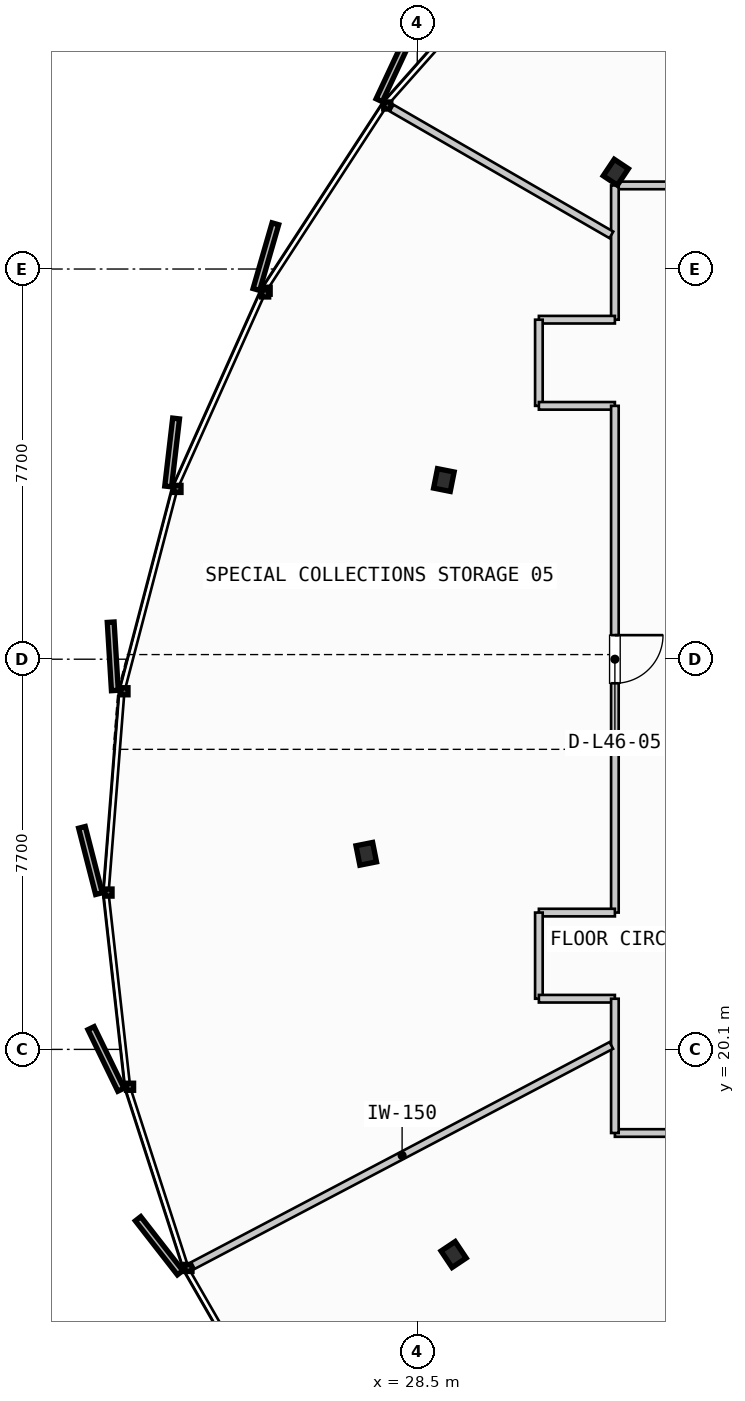
"""IFC4 building model, lengths in metres.
Left out: names, types, materials, properties, quantities, classifications, styles, units other than length and angle.
Written with IfcOpenShell. Run it as: python <this file> out.ifc"""

import sys

from ifc_helpers import new_model, si_unit, direction, frame, frame_2d, origin, origin_2d, place, context, subcontext, project, spatial, rectangle, i_section, extrude, source, transform, mapped, element, fill, save


model = new_model("IFC4")
c1 = context("Model", 3, precision=1e-05, world=origin(), true_north=direction((0.0, 1.0)))
c2 = subcontext(c1, "Body", "Model", "MODEL_VIEW")
j1 = project(units=[si_unit("LENGTHUNIT", "METRE"), si_unit("PLANEANGLEUNIT", "RADIAN")], contexts=[c1])
p1 = place(None, origin())
s1 = spatial("IfcSite", under=j1, at=p1, CompositionType="ELEMENT")
p2 = place(p1, origin())
s2 = spatial("IfcBuilding", under=s1, at=p2, CompositionType="ELEMENT")
p3 = place(p2, frame((0.0, 0.0, 179.9)))
s3 = spatial("IfcBuildingStorey", under=s2, at=p3, CompositionType="ELEMENT", Elevation=179.9)
m1 = source(origin(), c2, "Body", "SweptSolid", [
    extrude(i_section(OverallWidth=0.391, OverallDepth=0.335, WebThickness=0.023, FlangeThickness=0.034, FilletRadius=0.015, at=origin_2d()), origin(), (0.0, 0.0, 1.0), 3.26),
])
for number, where, z_axis, x_axis in (
    (1, (32.418, 37.409, 0.0), (0.0, 0.0, 1.0), (-0.831, 0.556, 0.0)),
    (2, (29.025, 31.336, 0.0), (0.0, 0.0, 1.0), (-0.981, 0.195, 0.0)),
    (3, (27.493, 23.96, 0.0), (0.0, 0.0, 1.0), (-0.981, -0.195, 0.0)),
    (4, (29.218, 16.052, 0.0), (0.0, 0.0, 1.0), (-0.831, -0.556, 0.0)),
):
    element("IfcColumn", number, at=place(p3, frame(where, z_axis=z_axis, x_axis=x_axis)), inside=s3, PredefinedType="COLUMN", context=c2, shape_type="MappedRepresentation", body=[
        mapped(m1, transform((0.0, 0.0, 0.0), scale=1.0)),
    ])
p4 = place(p3, frame((32.4, 18.45, 0.0), z_axis=(0.0, 0.0, 1.0), x_axis=(1.0, 0.0, 0.0)))
e5 = element("IfcWall", 5, at=p4, inside=s3, PredefinedType="PARTITIONING", context=c2, shape_type="SweptSolid", body=[
    extrude(rectangle(XDim=28.35, YDim=0.15, at=frame_2d((14.175, 0.0))), origin(), (0.0, 0.0, 1.0), 2.28),
])
p5 = place(p4, frame((5.362, 0.0, 0.0)))
e6 = element("IfcOpeningElement", 6, at=p5, cuts=e5, PredefinedType="OPENING", context=c2, shape_type="SweptSolid", body=[
    extrude(rectangle(XDim=0.95, YDim=2.15, at=frame_2d((0.475, 1.075))), frame((0.0, 0.085, 0.0), z_axis=(0.0, -1.0, 0.0), x_axis=(1.0, 0.0, 0.0)), (0.0, 0.0, 1.0), 0.17),
])
p6 = place(p4, frame((18.948, 0.0, 0.0)))
e7 = element("IfcOpeningElement", 7, at=p6, cuts=e5, PredefinedType="OPENING", context=c2, shape_type="SweptSolid", body=[
    extrude(rectangle(XDim=0.95, YDim=2.15, at=frame_2d((0.475, 1.075))), frame((0.0, 0.085, 0.0), z_axis=(0.0, -1.0, 0.0), x_axis=(1.0, 0.0, 0.0)), (0.0, 0.0, 1.0), 0.17),
])
p7 = place(p3, frame((60.75, 37.15, 0.0), z_axis=(0.0, 0.0, 1.0), x_axis=(-1.0, 0.0, 0.0)))
e8 = element("IfcWall", 8, at=p7, inside=s3, PredefinedType="PARTITIONING", context=c2, shape_type="SweptSolid", body=[
    extrude(rectangle(XDim=28.35, YDim=0.15, at=frame_2d((14.175, 0.0))), origin(), (0.0, 0.0, 1.0), 2.28),
])
p8 = place(p7, frame((15.347, 0.0, 0.0)))
e9 = element("IfcOpeningElement", 9, at=p8, cuts=e8, PredefinedType="OPENING", context=c2, shape_type="SweptSolid", body=[
    extrude(rectangle(XDim=0.95, YDim=2.15, at=frame_2d((0.475, 1.075))), frame((0.0, 0.085, 0.0), z_axis=(0.0, -1.0, 0.0), x_axis=(1.0, 0.0, 0.0)), (0.0, 0.0, 1.0), 0.17),
])
p9 = place(p3, frame((32.4, 37.15, 0.0), z_axis=(0.0, 0.0, 1.0), x_axis=(0.0, -1.0, 0.0)))
e10 = element("IfcWall", 10, at=p9, inside=s3, PredefinedType="PARTITIONING", context=c2, shape_type="SweptSolid", body=[
    extrude(rectangle(XDim=2.65, YDim=0.15, at=frame_2d((1.325, 0.0))), origin(), (0.0, 0.0, 1.0), 2.28),
])
p10 = place(p3, frame((32.4, 34.5, 0.0), z_axis=(0.0, 0.0, 1.0), x_axis=(-1.0, 0.0, 0.0)))
e11 = element("IfcWall", 11, at=p10, inside=s3, PredefinedType="PARTITIONING", context=c2, shape_type="SweptSolid", body=[
    extrude(rectangle(XDim=1.5, YDim=0.15, at=frame_2d((0.75, 0.0))), origin(), (0.0, 0.0, 1.0), 2.28),
])
p11 = place(p3, frame((30.9, 34.5, 0.0), z_axis=(0.0, 0.0, 1.0), x_axis=(0.0, -1.0, 0.0)))
e12 = element("IfcWall", 12, at=p11, inside=s3, PredefinedType="PARTITIONING", context=c2, shape_type="SweptSolid", body=[
    extrude(rectangle(XDim=1.7, YDim=0.15, at=frame_2d((0.85, 0.0))), origin(), (0.0, 0.0, 1.0), 2.28),
])
p12 = place(p3, frame((30.9, 32.8, 0.0), z_axis=(0.0, 0.0, 1.0), x_axis=(1.0, 0.0, 0.0)))
e13 = element("IfcWall", 13, at=p12, inside=s3, PredefinedType="PARTITIONING", context=c2, shape_type="SweptSolid", body=[
    extrude(rectangle(XDim=1.5, YDim=0.15, at=frame_2d((0.75, 0.0))), origin(), (0.0, 0.0, 1.0), 2.28),
])
p13 = place(p3, frame((32.4, 32.8, 0.0), z_axis=(0.0, 0.0, 1.0), x_axis=(0.0, -1.0, 0.0)))
e14 = element("IfcWall", 14, at=p13, inside=s3, PredefinedType="PARTITIONING", context=c2, shape_type="SweptSolid", body=[
    extrude(rectangle(XDim=10.0, YDim=0.15, at=frame_2d((5.0, 0.0))), origin(), (0.0, 0.0, 1.0), 2.28),
])
p14 = place(p13, frame((4.525, 0.0, 0.0)))
e15 = element("IfcOpeningElement", 15, at=p14, cuts=e14, PredefinedType="OPENING", context=c2, shape_type="SweptSolid", body=[
    extrude(rectangle(XDim=0.95, YDim=2.15, at=frame_2d((0.475, 1.075))), frame((0.0, 0.085, 0.0), z_axis=(0.0, -1.0, 0.0), x_axis=(1.0, 0.0, 0.0)), (0.0, 0.0, 1.0), 0.17),
])
p15 = place(p3, frame((32.4, 22.8, 0.0), z_axis=(0.0, 0.0, 1.0), x_axis=(-1.0, 0.0, 0.0)))
e16 = element("IfcWall", 16, at=p15, inside=s3, PredefinedType="PARTITIONING", context=c2, shape_type="SweptSolid", body=[
    extrude(rectangle(XDim=1.5, YDim=0.15, at=frame_2d((0.75, 0.0))), origin(), (0.0, 0.0, 1.0), 2.28),
])
p16 = place(p3, frame((30.9, 22.8, 0.0), z_axis=(0.0, 0.0, 1.0), x_axis=(0.0, -1.0, 0.0)))
e17 = element("IfcWall", 17, at=p16, inside=s3, PredefinedType="PARTITIONING", context=c2, shape_type="SweptSolid", body=[
    extrude(rectangle(XDim=1.7, YDim=0.15, at=frame_2d((0.85, 0.0))), origin(), (0.0, 0.0, 1.0), 2.28),
])
p17 = place(p3, frame((30.9, 21.1, 0.0), z_axis=(0.0, 0.0, 1.0), x_axis=(1.0, 0.0, 0.0)))
e18 = element("IfcWall", 18, at=p17, inside=s3, PredefinedType="PARTITIONING", context=c2, shape_type="SweptSolid", body=[
    extrude(rectangle(XDim=1.5, YDim=0.15, at=frame_2d((0.75, 0.0))), origin(), (0.0, 0.0, 1.0), 2.28),
])
p18 = place(p3, frame((32.4, 21.1, 0.0), z_axis=(0.0, 0.0, 1.0), x_axis=(0.0, -1.0, 0.0)))
e19 = element("IfcWall", 19, at=p18, inside=s3, PredefinedType="PARTITIONING", context=c2, shape_type="SweptSolid", body=[
    extrude(rectangle(XDim=2.65, YDim=0.15, at=frame_2d((1.325, 0.0))), origin(), (0.0, 0.0, 1.0), 2.28),
])
p19 = place(p3, frame((32.329, 20.178, 0.0), z_axis=(0.0, 0.0, 1.0), x_axis=(-0.884982922919, -0.465623481089, 0.0)))
e20 = element("IfcWall", 20, at=p19, inside=s3, PredefinedType="PARTITIONING", context=c2, shape_type="SweptSolid", body=[
    extrude(rectangle(XDim=9.33, YDim=0.15, at=frame_2d((4.665, 0.0))), origin(), (0.0, 0.0, 1.0), 2.28),
])
p20 = place(p3, frame((32.331, 36.174, 0.0), z_axis=(0.0, 0.0, 1.0), x_axis=(-0.866065421185, 0.499930681422, 0.0)))
e21 = element("IfcWall", 21, at=p20, inside=s3, PredefinedType="PARTITIONING", context=c2, shape_type="SweptSolid", body=[
    extrude(rectangle(XDim=5.007, YDim=0.15, at=frame_2d((2.503, 0.0))), origin(), (0.0, 0.0, 1.0), 2.28),
])
m2 = source(origin(), c2, "Body", "SweptSolid", [
    extrude(rectangle(XDim=0.95, YDim=2.15, at=frame_2d((0.475, 1.075))), frame((0.0, 0.025, 0.0), z_axis=(0.0, -1.0, 0.0), x_axis=(1.0, 0.0, 0.0)), (0.0, 0.0, 1.0), 0.05),
])
p21 = place(p14, origin())
e22 = element("IfcDoor", 22, at=p21, inside=s3, OperationType="SINGLE_SWING_LEFT", PredefinedType="DOOR", context=c2, shape_type="MappedRepresentation", body=[
    mapped(m2, transform((0.0, 0.0, 0.0), scale=1.0)),
])
fill(e15, e22)
save(model, sys.argv[1])
